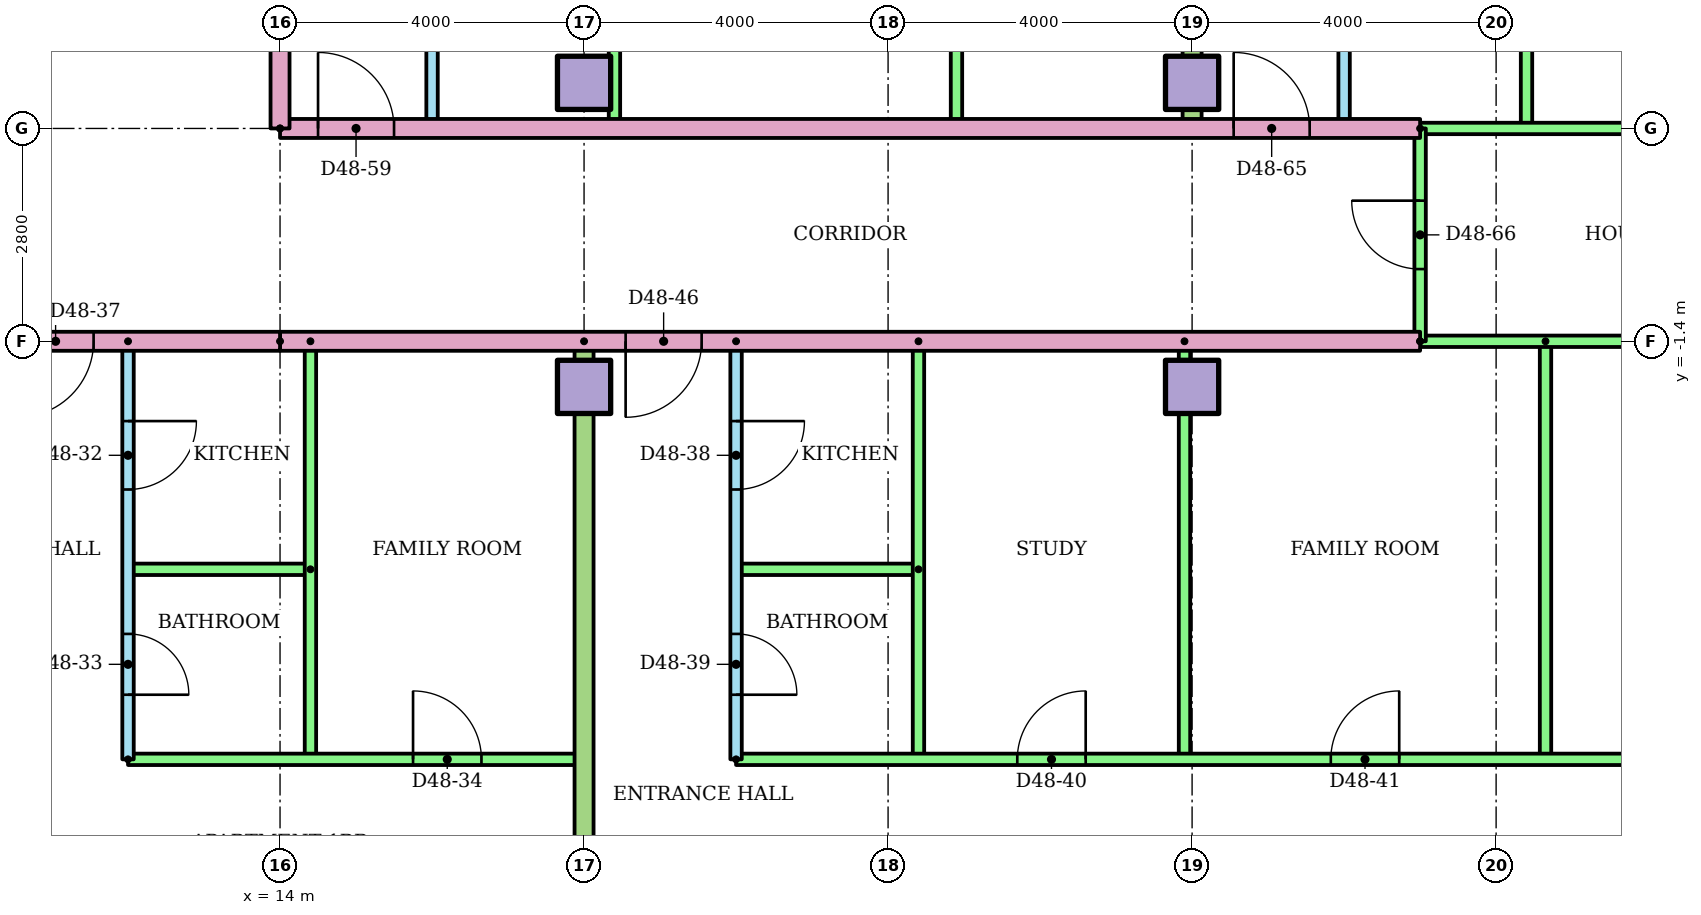
"""IFC4 building model, lengths in metres.
Left out: names, types, materials, properties, quantities, classifications, styles, units other than length and angle.
Written with IfcOpenShell. Run it as: python <this file> out.ifc"""

import sys

from ifc_helpers import new_model, si_unit, direction, frame, frame_2d, origin, origin_2d, place, context, subcontext, project, spatial, rectangle, extrude, element, fill, save


model = new_model("IFC4")
c1 = context("Model", 3, precision=1e-05, world=origin(), true_north=direction((0.0, 1.0)))
c2 = subcontext(c1, "Body", "Model", "MODEL_VIEW")
j1 = project(units=[si_unit("LENGTHUNIT", "METRE"), si_unit("PLANEANGLEUNIT", "RADIAN")], contexts=[c1])
p1 = place(None, origin())
s1 = spatial("IfcSite", under=j1, at=p1, CompositionType="ELEMENT")
p2 = place(p1, origin())
s2 = spatial("IfcBuilding", under=s1, at=p2, CompositionType="ELEMENT")
p3 = place(p2, frame((0.0, 0.0, 184.5)))
s3 = spatial("IfcBuildingStorey", under=s2, at=p3, CompositionType="ELEMENT", Elevation=184.5)
for number, where in (
    (1, (18.0, -2.0, 0.0)),
    (2, (26.0, -2.0, 0.0)),
    (3, (18.0, 2.0, 0.0)),
    (4, (26.0, 2.0, 0.0)),
):
    element("IfcColumn", number, at=place(p3, frame(where)), inside=s3, PredefinedType="COLUMN", context=c2, shape_type="SweptSolid", body=[
        extrude(rectangle(XDim=0.7, YDim=0.7, at=origin_2d()), origin(), (0.0, 0.0, 1.0), 3.2),
    ])
p4 = place(p3, frame((12.0, -1.4, 0.0), z_axis=(0.0, 0.0, 1.0), x_axis=(0.0, -1.0, 0.0)))
e5 = element("IfcWall", 5, at=p4, inside=s3, PredefinedType="PARTITIONING", context=c2, shape_type="SweptSolid", body=[
    extrude(rectangle(XDim=5.5, YDim=0.15, at=frame_2d((2.75, 0.0))), origin(), (0.0, 0.0, 1.0), 2.4),
])
p5 = place(p4, frame((1.05, 0.0, 0.0)))
e6 = element("IfcOpeningElement", 6, at=p5, cuts=e5, PredefinedType="OPENING", context=c2, shape_type="SweptSolid", body=[
    extrude(rectangle(XDim=0.9, YDim=2.1, at=frame_2d((0.45, 1.05))), frame((0.0, 0.085, 0.0), z_axis=(0.0, -1.0, 0.0), x_axis=(1.0, 0.0, 0.0)), (0.0, 0.0, 1.0), 0.17),
])
p6 = place(p4, frame((3.85, 0.0, 0.0)))
e7 = element("IfcOpeningElement", 7, at=p6, cuts=e5, PredefinedType="OPENING", context=c2, shape_type="SweptSolid", body=[
    extrude(rectangle(XDim=0.8, YDim=2.1, at=frame_2d((0.4, 1.05))), frame((0.0, 0.085, 0.0), z_axis=(0.0, -1.0, 0.0), x_axis=(1.0, 0.0, 0.0)), (0.0, 0.0, 1.0), 0.17),
])
p7 = place(p3, frame((14.4, -4.4, 0.0), z_axis=(0.0, 0.0, 1.0), x_axis=(-1.0, 0.0, 0.0)))
e8 = element("IfcWall", 8, at=p7, inside=s3, PredefinedType="PARTITIONING", context=c2, shape_type="SweptSolid", body=[
    extrude(rectangle(XDim=2.4, YDim=0.15, at=frame_2d((1.2, 0.0))), origin(), (0.0, 0.0, 1.0), 2.4),
])
p8 = place(p3, frame((14.4, -1.4, 0.0), z_axis=(0.0, 0.0, 1.0), x_axis=(0.0, -1.0, 0.0)))
e9 = element("IfcWall", 9, at=p8, inside=s3, PredefinedType="PARTITIONING", context=c2, shape_type="SweptSolid", body=[
    extrude(rectangle(XDim=5.5, YDim=0.15, at=frame_2d((2.75, 0.0))), origin(), (0.0, 0.0, 1.0), 2.4),
])
p9 = place(p3, frame((12.0, -6.9, 0.0)))
e10 = element("IfcWall", 10, at=p9, inside=s3, PredefinedType="PARTITIONING", context=c2, shape_type="SweptSolid", body=[
    extrude(rectangle(XDim=6.0, YDim=0.15, at=frame_2d((3.0, 0.0))), origin(), (0.0, 0.0, 1.0), 2.4),
])
p10 = place(p9, frame((3.75, 0.0, 0.0)))
e11 = element("IfcOpeningElement", 11, at=p10, cuts=e10, PredefinedType="OPENING", context=c2, shape_type="SweptSolid", body=[
    extrude(rectangle(XDim=0.9, YDim=2.1, at=frame_2d((0.45, 1.05))), frame((0.0, 0.085, 0.0), z_axis=(0.0, -1.0, 0.0), x_axis=(1.0, 0.0, 0.0)), (0.0, 0.0, 1.0), 0.17),
])
p11 = place(p3, frame((20.0, -1.4, 0.0), z_axis=(0.0, 0.0, 1.0), x_axis=(0.0, -1.0, 0.0)))
e12 = element("IfcWall", 12, at=p11, inside=s3, PredefinedType="PARTITIONING", context=c2, shape_type="SweptSolid", body=[
    extrude(rectangle(XDim=5.5, YDim=0.15, at=frame_2d((2.75, 0.0))), origin(), (0.0, 0.0, 1.0), 2.4),
])
p12 = place(p11, frame((1.05, 0.0, 0.0)))
e13 = element("IfcOpeningElement", 13, at=p12, cuts=e12, PredefinedType="OPENING", context=c2, shape_type="SweptSolid", body=[
    extrude(rectangle(XDim=0.9, YDim=2.1, at=frame_2d((0.45, 1.05))), frame((0.0, 0.085, 0.0), z_axis=(0.0, -1.0, 0.0), x_axis=(1.0, 0.0, 0.0)), (0.0, 0.0, 1.0), 0.17),
])
p13 = place(p11, frame((3.85, 0.0, 0.0)))
e14 = element("IfcOpeningElement", 14, at=p13, cuts=e12, PredefinedType="OPENING", context=c2, shape_type="SweptSolid", body=[
    extrude(rectangle(XDim=0.8, YDim=2.1, at=frame_2d((0.4, 1.05))), frame((0.0, 0.085, 0.0), z_axis=(0.0, -1.0, 0.0), x_axis=(1.0, 0.0, 0.0)), (0.0, 0.0, 1.0), 0.17),
])
p14 = place(p3, frame((22.4, -4.4, 0.0), z_axis=(0.0, 0.0, 1.0), x_axis=(-1.0, 0.0, 0.0)))
e15 = element("IfcWall", 15, at=p14, inside=s3, PredefinedType="PARTITIONING", context=c2, shape_type="SweptSolid", body=[
    extrude(rectangle(XDim=2.4, YDim=0.15, at=frame_2d((1.2, 0.0))), origin(), (0.0, 0.0, 1.0), 2.4),
])
for number, where, z_axis, x_axis in (
    (16, (22.4, -1.4, 0.0), (0.0, 0.0, 1.0), (0.0, -1.0, 0.0)),
    (17, (25.9, -1.4, 0.0), (0.0, 0.0, 1.0), (0.0, -1.0, 0.0)),
    (18, (30.65, -1.4, 0.0), (0.0, 0.0, 1.0), (0.0, -1.0, 0.0)),
):
    element("IfcWall", number, at=place(p3, frame(where, z_axis=z_axis, x_axis=x_axis)), inside=s3, PredefinedType="PARTITIONING", context=c2, shape_type="SweptSolid", body=[
        extrude(rectangle(XDim=5.5, YDim=0.15, at=frame_2d((2.75, 0.0))), origin(), (0.0, 0.0, 1.0), 2.4),
    ])
p15 = place(p3, frame((20.0, -6.9, 0.0)))
e19 = element("IfcWall", 19, at=p15, inside=s3, PredefinedType="PARTITIONING", context=c2, shape_type="SweptSolid", body=[
    extrude(rectangle(XDim=16.82, YDim=0.15, at=frame_2d((8.41, 0.0))), origin(), (0.0, 0.0, 1.0), 2.4),
])
p16 = place(p15, frame((3.7, 0.0, 0.0)))
e20 = element("IfcOpeningElement", 20, at=p16, cuts=e19, PredefinedType="OPENING", context=c2, shape_type="SweptSolid", body=[
    extrude(rectangle(XDim=0.9, YDim=2.1, at=frame_2d((0.45, 1.05))), frame((0.0, 0.085, 0.0), z_axis=(0.0, -1.0, 0.0), x_axis=(1.0, 0.0, 0.0)), (0.0, 0.0, 1.0), 0.17),
])
p17 = place(p15, frame((7.825, 0.0, 0.0)))
e21 = element("IfcOpeningElement", 21, at=p17, cuts=e19, PredefinedType="OPENING", context=c2, shape_type="SweptSolid", body=[
    extrude(rectangle(XDim=0.9, YDim=2.1, at=frame_2d((0.45, 1.05))), frame((0.0, 0.085, 0.0), z_axis=(0.0, -1.0, 0.0), x_axis=(1.0, 0.0, 0.0)), (0.0, 0.0, 1.0), 0.17),
])
p18 = place(p15, frame((13.175, 0.0, 0.0)))
e22 = element("IfcOpeningElement", 22, at=p18, cuts=e19, PredefinedType="OPENING", context=c2, shape_type="SweptSolid", body=[
    extrude(rectangle(XDim=0.9, YDim=2.1, at=frame_2d((0.45, 1.05))), frame((0.0, 0.085, 0.0), z_axis=(0.0, -1.0, 0.0), x_axis=(1.0, 0.0, 0.0)), (0.0, 0.0, 1.0), 0.17),
])
p19 = place(p3, frame((18.0, -1.4, 0.0), z_axis=(0.0, 0.0, 1.0), x_axis=(0.0, -1.0, 0.0)))
e23 = element("IfcWall", 23, at=p19, inside=s3, PredefinedType="PARTITIONING", context=c2, shape_type="SweptSolid", body=[
    extrude(rectangle(XDim=15.01, YDim=0.25, at=frame_2d((7.505, 0.0))), origin(), (0.0, 0.0, 1.0), 2.4),
])
p20 = place(p3, frame((29.0, -1.4, 0.0), z_axis=(0.0, 0.0, 1.0), x_axis=(-1.0, 0.0, 0.0)))
e24 = element("IfcWall", 24, at=p20, inside=s3, PredefinedType="PARTITIONING", context=c2, shape_type="SweptSolid", body=[
    extrude(rectangle(XDim=15.0, YDim=0.25, at=frame_2d((7.5, 0.0))), origin(), (0.0, 0.0, 1.0), 2.4),
])
p21 = place(p20, frame((9.453, 0.0, 0.0)))
e25 = element("IfcOpeningElement", 25, at=p21, cuts=e24, PredefinedType="OPENING", context=c2, shape_type="SweptSolid", body=[
    extrude(rectangle(XDim=1.0, YDim=2.1, at=frame_2d((0.5, 1.05))), frame((0.0, 0.135, 0.0), z_axis=(0.0, -1.0, 0.0), x_axis=(1.0, 0.0, 0.0)), (0.0, 0.0, 1.0), 0.27),
])
p22 = place(p3, frame((36.82, -1.4, 0.0), z_axis=(0.0, 0.0, 1.0), x_axis=(-1.0, 0.0, 0.0)))
e26 = element("IfcWall", 26, at=p22, inside=s3, PredefinedType="PARTITIONING", context=c2, shape_type="SweptSolid", body=[
    extrude(rectangle(XDim=7.82, YDim=0.15, at=frame_2d((3.91, 0.0))), origin(), (0.0, 0.0, 1.0), 2.4),
])
p23 = place(p3, frame((16.0, 9.3, 0.0), z_axis=(0.0, 0.0, 1.0), x_axis=(0.0, -1.0, 0.0)))
e27 = element("IfcWall", 27, at=p23, inside=s3, PredefinedType="PARTITIONING", context=c2, shape_type="SweptSolid", body=[
    extrude(rectangle(XDim=7.9, YDim=0.15, at=frame_2d((3.95, 0.0))), origin(), (0.0, 0.0, 1.0), 2.4),
])
p24 = place(p23, frame((5.325, 0.0, 0.0)))
e28 = element("IfcOpeningElement", 28, at=p24, cuts=e27, PredefinedType="OPENING", context=c2, shape_type="SweptSolid", body=[
    extrude(rectangle(XDim=0.9, YDim=2.1, at=frame_2d((0.45, 1.05))), frame((0.0, 0.085, 0.0), z_axis=(0.0, -1.0, 0.0), x_axis=(1.0, 0.0, 0.0)), (0.0, 0.0, 1.0), 0.17),
])
p25 = place(p23, frame((1.425, 0.0, 0.0)))
e29 = element("IfcOpeningElement", 29, at=p25, cuts=e27, PredefinedType="OPENING", context=c2, shape_type="SweptSolid", body=[
    extrude(rectangle(XDim=0.8, YDim=2.1, at=frame_2d((0.4, 1.05))), frame((0.0, 0.085, 0.0), z_axis=(0.0, -1.0, 0.0), x_axis=(1.0, 0.0, 0.0)), (0.0, 0.0, 1.0), 0.17),
])
for number, where, z_axis, x_axis in (
    (30, (18.4, 9.3, 0.0), (0.0, 0.0, 1.0), (0.0, -1.0, 0.0)),
    (31, (22.9, 9.3, 0.0), (0.0, 0.0, 1.0), (0.0, -1.0, 0.0)),
):
    element("IfcWall", number, at=place(p3, frame(where, z_axis=z_axis, x_axis=x_axis)), inside=s3, PredefinedType="PARTITIONING", context=c2, shape_type="SweptSolid", body=[
        extrude(rectangle(XDim=7.9, YDim=0.15, at=frame_2d((3.95, 0.0))), origin(), (0.0, 0.0, 1.0), 2.4),
    ])
p26 = place(p3, frame((28.0, 9.3, 0.0), z_axis=(0.0, 0.0, 1.0), x_axis=(0.0, -1.0, 0.0)))
e32 = element("IfcWall", 32, at=p26, inside=s3, PredefinedType="PARTITIONING", context=c2, shape_type="SweptSolid", body=[
    extrude(rectangle(XDim=7.9, YDim=0.15, at=frame_2d((3.95, 0.0))), origin(), (0.0, 0.0, 1.0), 2.4),
])
p27 = place(p26, frame((5.325, 0.0, 0.0)))
e33 = element("IfcOpeningElement", 33, at=p27, cuts=e32, PredefinedType="OPENING", context=c2, shape_type="SweptSolid", body=[
    extrude(rectangle(XDim=0.9, YDim=2.1, at=frame_2d((0.45, 1.05))), frame((0.0, 0.085, 0.0), z_axis=(0.0, -1.0, 0.0), x_axis=(1.0, 0.0, 0.0)), (0.0, 0.0, 1.0), 0.17),
])
p28 = place(p26, frame((1.425, 0.0, 0.0)))
e34 = element("IfcOpeningElement", 34, at=p28, cuts=e32, PredefinedType="OPENING", context=c2, shape_type="SweptSolid", body=[
    extrude(rectangle(XDim=0.8, YDim=2.1, at=frame_2d((0.4, 1.05))), frame((0.0, 0.085, 0.0), z_axis=(0.0, -1.0, 0.0), x_axis=(1.0, 0.0, 0.0)), (0.0, 0.0, 1.0), 0.17),
])
p29 = place(p3, frame((30.4, 9.3, 0.0), z_axis=(0.0, 0.0, 1.0), x_axis=(0.0, -1.0, 0.0)))
e35 = element("IfcWall", 35, at=p29, inside=s3, PredefinedType="PARTITIONING", context=c2, shape_type="SweptSolid", body=[
    extrude(rectangle(XDim=7.9, YDim=0.15, at=frame_2d((3.95, 0.0))), origin(), (0.0, 0.0, 1.0), 2.4),
])
p30 = place(p3, frame((26.0, 18.821, 0.0), z_axis=(0.0, 0.0, 1.0), x_axis=(0.0, -1.0, 0.0)))
e36 = element("IfcWall", 36, at=p30, inside=s3, PredefinedType="PARTITIONING", context=c2, shape_type="SweptSolid", body=[
    extrude(rectangle(XDim=17.421, YDim=0.25, at=frame_2d((8.71, 0.0))), origin(), (0.0, 0.0, 1.0), 2.4),
])
p31 = place(p3, frame((14.0, 1.4, 0.0)))
e37 = element("IfcWall", 37, at=p31, inside=s3, PredefinedType="PARTITIONING", context=c2, shape_type="SweptSolid", body=[
    extrude(rectangle(XDim=15.0, YDim=0.25, at=frame_2d((7.5, 0.0))), origin(), (0.0, 0.0, 1.0), 2.4),
])
p32 = place(p31, frame((0.5, 0.0, 0.0)))
e38 = element("IfcOpeningElement", 38, at=p32, cuts=e37, PredefinedType="OPENING", context=c2, shape_type="SweptSolid", body=[
    extrude(rectangle(XDim=1.0, YDim=2.1, at=frame_2d((0.5, 1.05))), frame((0.0, 0.135, 0.0), z_axis=(0.0, -1.0, 0.0), x_axis=(1.0, 0.0, 0.0)), (0.0, 0.0, 1.0), 0.27),
])
p33 = place(p31, frame((12.547, 0.0, 0.0)))
e39 = element("IfcOpeningElement", 39, at=p33, cuts=e37, PredefinedType="OPENING", context=c2, shape_type="SweptSolid", body=[
    extrude(rectangle(XDim=1.0, YDim=2.1, at=frame_2d((0.5, 1.05))), frame((0.0, 0.135, 0.0), z_axis=(0.0, -1.0, 0.0), x_axis=(1.0, 0.0, 0.0)), (0.0, 0.0, 1.0), 0.27),
])
p34 = place(p3, frame((29.0, 1.4, 0.0)))
e40 = element("IfcWall", 40, at=p34, inside=s3, PredefinedType="PARTITIONING", context=c2, shape_type="SweptSolid", body=[
    extrude(rectangle(XDim=7.82, YDim=0.15, at=frame_2d((3.91, 0.0))), origin(), (0.0, 0.0, 1.0), 2.4),
])
p35 = place(p3, frame((29.0, -1.4, 0.0), z_axis=(0.0, 0.0, 1.0), x_axis=(0.0, 1.0, 0.0)))
e41 = element("IfcWall", 41, at=p35, inside=s3, PredefinedType="PARTITIONING", context=c2, shape_type="SweptSolid", body=[
    extrude(rectangle(XDim=2.8, YDim=0.15, at=frame_2d((1.4, 0.0))), origin(), (0.0, 0.0, 1.0), 2.4),
])
p36 = place(p35, frame((0.95, 0.0, 0.0)))
e42 = element("IfcOpeningElement", 42, at=p36, cuts=e41, PredefinedType="OPENING", context=c2, shape_type="SweptSolid", body=[
    extrude(rectangle(XDim=0.9, YDim=2.1, at=frame_2d((0.45, 1.05))), frame((0.0, 0.085, 0.0), z_axis=(0.0, -1.0, 0.0), x_axis=(1.0, 0.0, 0.0)), (0.0, 0.0, 1.0), 0.17),
])
p37 = place(p3, frame((14.0, -1.4, 0.0), z_axis=(0.0, 0.0, 1.0), x_axis=(-1.0, 0.0, 0.0)))
e43 = element("IfcWall", 43, at=p37, inside=s3, PredefinedType="PARTITIONING", context=c2, shape_type="SweptSolid", body=[
    extrude(rectangle(XDim=28.0, YDim=0.25, at=frame_2d((14.0, 0.0))), origin(), (0.0, 0.0, 1.0), 2.4),
])
p38 = place(p37, frame((4.547, 0.0, 0.0)))
e44 = element("IfcOpeningElement", 44, at=p38, cuts=e43, PredefinedType="OPENING", context=c2, shape_type="SweptSolid", body=[
    extrude(rectangle(XDim=1.0, YDim=2.1, at=frame_2d((0.5, 1.05))), frame((0.0, 0.135, 0.0), z_axis=(0.0, -1.0, 0.0), x_axis=(1.0, 0.0, 0.0)), (0.0, 0.0, 1.0), 0.27),
])
p39 = place(p37, frame((2.453, 0.0, 0.0)))
e45 = element("IfcOpeningElement", 45, at=p39, cuts=e43, PredefinedType="OPENING", context=c2, shape_type="SweptSolid", body=[
    extrude(rectangle(XDim=1.0, YDim=2.1, at=frame_2d((0.5, 1.05))), frame((0.0, 0.135, 0.0), z_axis=(0.0, -1.0, 0.0), x_axis=(1.0, 0.0, 0.0)), (0.0, 0.0, 1.0), 0.27),
])
p40 = place(p3, frame((14.0, 1.4, 0.0), z_axis=(0.0, 0.0, 1.0), x_axis=(0.0, 1.0, 0.0)))
e46 = element("IfcWall", 46, at=p40, inside=s3, PredefinedType="PARTITIONING", context=c2, shape_type="SweptSolid", body=[
    extrude(rectangle(XDim=1.6, YDim=0.25, at=frame_2d((0.8, 0.0))), origin(), (0.0, 0.0, 1.0), 2.4),
])
p41 = place(p5, origin())
e47 = element("IfcDoor", 47, at=p41, inside=s3, OperationType="SINGLE_SWING_LEFT", PredefinedType="DOOR", context=c2, shape_type="SweptSolid", body=[
    extrude(rectangle(XDim=0.9, YDim=2.1, at=frame_2d((0.45, 1.05))), frame((0.0, 0.025, 0.0), z_axis=(0.0, -1.0, 0.0), x_axis=(1.0, 0.0, 0.0)), (0.0, 0.0, 1.0), 0.05),
])
fill(e6, e47)
p42 = place(p6, origin())
e48 = element("IfcDoor", 48, at=p42, inside=s3, OperationType="SINGLE_SWING_RIGHT", PredefinedType="DOOR", context=c2, shape_type="SweptSolid", body=[
    extrude(rectangle(XDim=0.8, YDim=2.1, at=frame_2d((0.4, 1.05))), frame((0.0, 0.025, 0.0), z_axis=(0.0, -1.0, 0.0), x_axis=(1.0, 0.0, 0.0)), (0.0, 0.0, 1.0), 0.05),
])
fill(e7, e48)
p43 = place(p10, origin())
e49 = element("IfcDoor", 49, at=p43, inside=s3, OperationType="SINGLE_SWING_LEFT", PredefinedType="DOOR", context=c2, shape_type="SweptSolid", body=[
    extrude(rectangle(XDim=0.9, YDim=2.1, at=frame_2d((0.45, 1.05))), frame((0.0, 0.025, 0.0), z_axis=(0.0, -1.0, 0.0), x_axis=(1.0, 0.0, 0.0)), (0.0, 0.0, 1.0), 0.05),
])
fill(e11, e49)
p44 = place(p39, origin())
e50 = element("IfcDoor", 50, at=p44, inside=s3, OperationType="SINGLE_SWING_RIGHT", PredefinedType="DOOR", context=c2, shape_type="SweptSolid", body=[
    extrude(rectangle(XDim=1.0, YDim=2.1, at=frame_2d((0.5, 1.05))), frame((0.0, 0.025, 0.0), z_axis=(0.0, -1.0, 0.0), x_axis=(1.0, 0.0, 0.0)), (0.0, 0.0, 1.0), 0.05),
])
fill(e45, e50)
p45 = place(p12, origin())
e51 = element("IfcDoor", 51, at=p45, inside=s3, OperationType="SINGLE_SWING_LEFT", PredefinedType="DOOR", context=c2, shape_type="SweptSolid", body=[
    extrude(rectangle(XDim=0.9, YDim=2.1, at=frame_2d((0.45, 1.05))), frame((0.0, 0.025, 0.0), z_axis=(0.0, -1.0, 0.0), x_axis=(1.0, 0.0, 0.0)), (0.0, 0.0, 1.0), 0.05),
])
fill(e13, e51)
p46 = place(p13, origin())
e52 = element("IfcDoor", 52, at=p46, inside=s3, OperationType="SINGLE_SWING_RIGHT", PredefinedType="DOOR", context=c2, shape_type="SweptSolid", body=[
    extrude(rectangle(XDim=0.8, YDim=2.1, at=frame_2d((0.4, 1.05))), frame((0.0, 0.025, 0.0), z_axis=(0.0, -1.0, 0.0), x_axis=(1.0, 0.0, 0.0)), (0.0, 0.0, 1.0), 0.05),
])
fill(e14, e52)
p47 = place(p16, origin())
e53 = element("IfcDoor", 53, at=p47, inside=s3, OperationType="SINGLE_SWING_RIGHT", PredefinedType="DOOR", context=c2, shape_type="SweptSolid", body=[
    extrude(rectangle(XDim=0.9, YDim=2.1, at=frame_2d((0.45, 1.05))), frame((0.0, 0.025, 0.0), z_axis=(0.0, -1.0, 0.0), x_axis=(1.0, 0.0, 0.0)), (0.0, 0.0, 1.0), 0.05),
])
fill(e20, e53)
p48 = place(p17, origin())
e54 = element("IfcDoor", 54, at=p48, inside=s3, OperationType="SINGLE_SWING_RIGHT", PredefinedType="DOOR", context=c2, shape_type="SweptSolid", body=[
    extrude(rectangle(XDim=0.9, YDim=2.1, at=frame_2d((0.45, 1.05))), frame((0.0, 0.025, 0.0), z_axis=(0.0, -1.0, 0.0), x_axis=(1.0, 0.0, 0.0)), (0.0, 0.0, 1.0), 0.05),
])
fill(e21, e54)
p49 = place(p21, origin())
e55 = element("IfcDoor", 55, at=p49, inside=s3, OperationType="SINGLE_SWING_RIGHT", PredefinedType="DOOR", context=c2, shape_type="SweptSolid", body=[
    extrude(rectangle(XDim=1.0, YDim=2.1, at=frame_2d((0.5, 1.05))), frame((0.0, 0.025, 0.0), z_axis=(0.0, -1.0, 0.0), x_axis=(1.0, 0.0, 0.0)), (0.0, 0.0, 1.0), 0.05),
])
fill(e25, e55)
p50 = place(p32, origin())
e56 = element("IfcDoor", 56, at=p50, inside=s3, OperationType="SINGLE_SWING_LEFT", PredefinedType="DOOR", context=c2, shape_type="SweptSolid", body=[
    extrude(rectangle(XDim=1.0, YDim=2.1, at=frame_2d((0.5, 1.05))), frame((0.0, 0.025, 0.0), z_axis=(0.0, -1.0, 0.0), x_axis=(1.0, 0.0, 0.0)), (0.0, 0.0, 1.0), 0.05),
])
fill(e38, e56)
p51 = place(p33, origin())
e57 = element("IfcDoor", 57, at=p51, inside=s3, OperationType="SINGLE_SWING_LEFT", PredefinedType="DOOR", context=c2, shape_type="SweptSolid", body=[
    extrude(rectangle(XDim=1.0, YDim=2.1, at=frame_2d((0.5, 1.05))), frame((0.0, 0.025, 0.0), z_axis=(0.0, -1.0, 0.0), x_axis=(1.0, 0.0, 0.0)), (0.0, 0.0, 1.0), 0.05),
])
fill(e39, e57)
p52 = place(p36, origin())
e58 = element("IfcDoor", 58, at=p52, inside=s3, OperationType="SINGLE_SWING_RIGHT", PredefinedType="DOOR", context=c2, shape_type="SweptSolid", body=[
    extrude(rectangle(XDim=0.9, YDim=2.1, at=frame_2d((0.45, 1.05))), frame((0.0, 0.025, 0.0), z_axis=(0.0, -1.0, 0.0), x_axis=(1.0, 0.0, 0.0)), (0.0, 0.0, 1.0), 0.05),
])
fill(e42, e58)
save(model, sys.argv[1])
